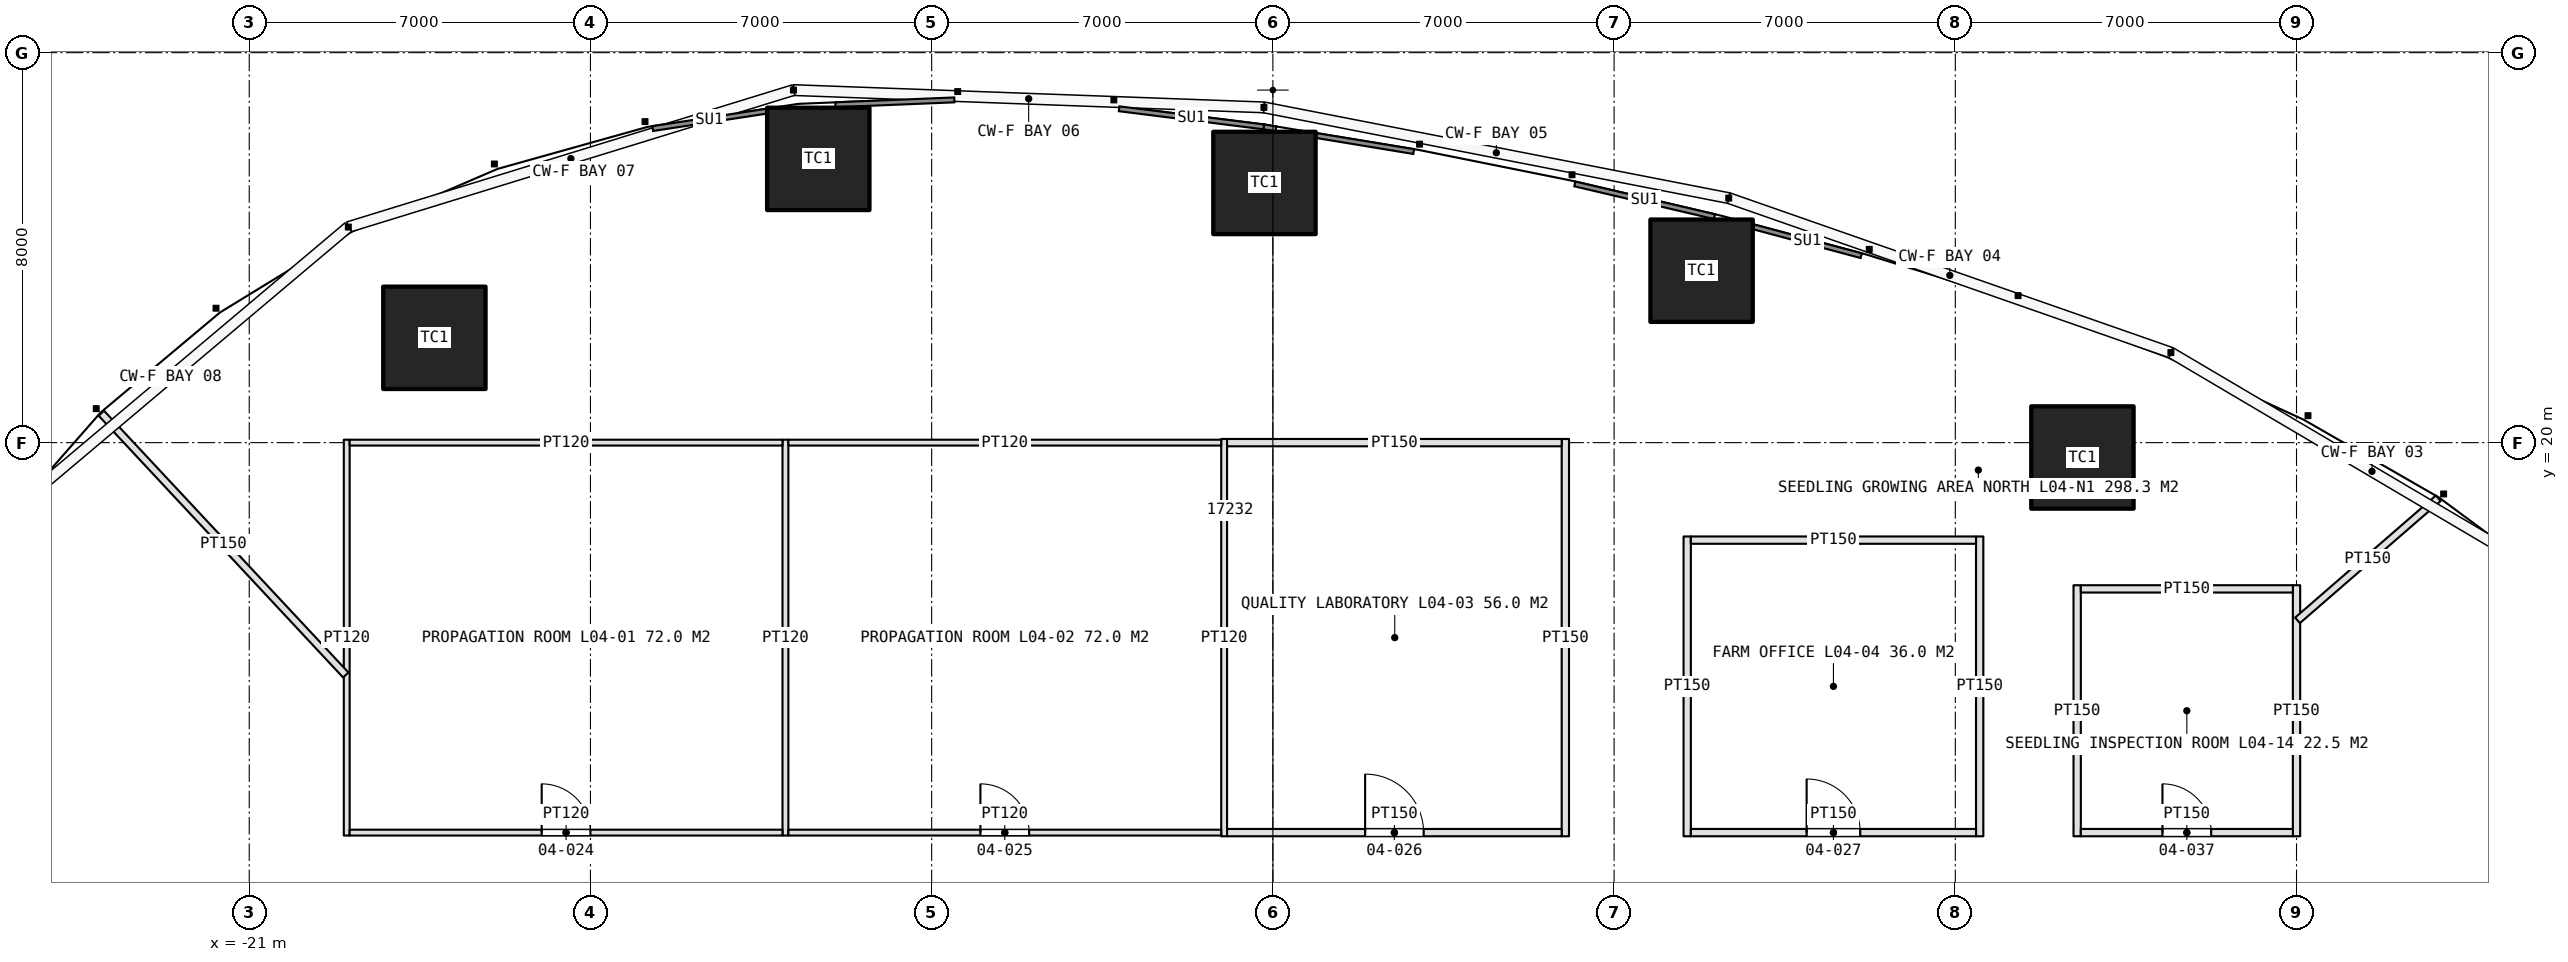
"""IFC4 building model, lengths in metres.
Left out: names, types, materials, properties, quantities, classifications, styles, units other than length and angle.
Written with IfcOpenShell. Run it as: python <this file> out.ifc"""

import sys

from ifc_helpers import new_model, si_unit, direction, frame, frame_2d, origin, origin_2d, place, context, subcontext, project, spatial, rectangle, extrude, element, fill, save


model = new_model("IFC4")
c1 = context("Model", 3, precision=1e-05, world=origin(), true_north=direction((0.0, 1.0)))
c2 = subcontext(c1, "Body", "Model", "MODEL_VIEW")
j1 = project(units=[si_unit("LENGTHUNIT", "METRE"), si_unit("PLANEANGLEUNIT", "RADIAN")], contexts=[c1])
p1 = place(None, origin())
s1 = spatial("IfcSite", under=j1, at=p1, CompositionType="ELEMENT")
p2 = place(p1, origin())
s2 = spatial("IfcBuilding", under=s1, at=p2, CompositionType="ELEMENT")
p3 = place(p2, frame((0.0, 0.0, 20.0)))
s3 = spatial("IfcBuildingStorey", under=s2, at=p3, CompositionType="ELEMENT", Elevation=20.0)
for number, where, z_axis, x_axis in (
    (1, (16.608, 19.695, 0.0), (0.0, 0.0, 1.0), (1.0, 0.0, 0.0)),
    (2, (8.795, 23.527, 0.0), (0.0, 0.0, 1.0), (1.0, 0.0, 0.0)),
    (3, (-0.173, 25.327, 0.0), (0.0, 0.0, 1.0), (1.0, 0.0, 0.0)),
    (4, (-9.326, 25.821, 0.0), (0.0, 0.0, 1.0), (1.0, 0.0, 0.0)),
    (5, (-17.202, 22.15, 0.0), (0.0, 0.0, 1.0), (1.0, 0.0, 0.0)),
):
    element("IfcColumn", number, at=place(p3, frame(where, z_axis=z_axis, x_axis=x_axis)), inside=s3, PredefinedType="COLUMN", context=c2, shape_type="SweptSolid", body=[
        extrude(rectangle(XDim=2.1, YDim=2.1, at=origin_2d()), origin(), (0.0, 0.0, 1.0), 5.0),
    ])
for number, where, z_axis, x_axis in (
    (6, (-19.0, 11.94, 0.0), (0.0, 0.0, 1.0), (0.0, 1.0, 0.0)),
    (7, (-10.0, 11.94, 0.0), (0.0, 0.0, 1.0), (0.0, 1.0, 0.0)),
):
    element("IfcWall", number, at=place(p3, frame(where, z_axis=z_axis, x_axis=x_axis)), inside=s3, PredefinedType="PARTITIONING", context=c2, shape_type="SweptSolid", body=[
        extrude(rectangle(XDim=8.12, YDim=0.12, at=frame_2d((4.06, 0.0))), origin(), (0.0, 0.0, 1.0), 3.6),
    ])
p4 = place(p3, frame((-1.0, 11.925, 0.0), z_axis=(0.0, 0.0, 1.0), x_axis=(0.0, 1.0, 0.0)))
e8 = element("IfcWall", 8, at=p4, inside=s3, PredefinedType="PARTITIONING", context=c2, shape_type="SweptSolid", body=[
    extrude(rectangle(XDim=8.15, YDim=0.12, at=frame_2d((4.075, 0.0))), origin(), (0.0, 0.0, 1.0), 3.6),
])
p5 = place(p3, frame((6.0, 11.925, 0.0), z_axis=(0.0, 0.0, 1.0), x_axis=(0.0, 1.0, 0.0)))
e9 = element("IfcWall", 9, at=p5, inside=s3, PredefinedType="PARTITIONING", context=c2, shape_type="SweptSolid", body=[
    extrude(rectangle(XDim=8.15, YDim=0.15, at=frame_2d((4.075, 0.0))), origin(), (0.0, 0.0, 1.0), 3.6),
])
p6 = place(p3, frame((-18.94, 12.0, 0.0), z_axis=(0.0, 0.0, 1.0), x_axis=(1.0, 0.0, 0.0)))
e10 = element("IfcWall", 10, at=p6, inside=s3, PredefinedType="PARTITIONING", context=c2, shape_type="SweptSolid", body=[
    extrude(rectangle(XDim=8.88, YDim=0.12, at=frame_2d((4.44, 0.0))), origin(), (0.0, 0.0, 1.0), 3.6),
])
p7 = place(p6, frame((3.94, 0.0, 0.0)))
e11 = element("IfcOpeningElement", 11, at=p7, cuts=e10, PredefinedType="OPENING", context=c2, shape_type="SweptSolid", body=[
    extrude(rectangle(XDim=1.0, YDim=2.2, at=frame_2d((0.5, 1.1))), frame((0.0, 0.07, 0.0), z_axis=(0.0, -1.0, 0.0), x_axis=(1.0, 0.0, 0.0)), (0.0, 0.0, 1.0), 0.14),
])
p8 = place(p3, frame((-18.94, 20.0, 0.0), z_axis=(0.0, 0.0, 1.0), x_axis=(1.0, 0.0, 0.0)))
e12 = element("IfcWall", 12, at=p8, inside=s3, PredefinedType="PARTITIONING", context=c2, shape_type="SweptSolid", body=[
    extrude(rectangle(XDim=8.88, YDim=0.12, at=frame_2d((4.44, 0.0))), origin(), (0.0, 0.0, 1.0), 3.6),
])
p9 = place(p3, frame((-9.94, 12.0, 0.0), z_axis=(0.0, 0.0, 1.0), x_axis=(1.0, 0.0, 0.0)))
e13 = element("IfcWall", 13, at=p9, inside=s3, PredefinedType="PARTITIONING", context=c2, shape_type="SweptSolid", body=[
    extrude(rectangle(XDim=8.88, YDim=0.12, at=frame_2d((4.44, 0.0))), origin(), (0.0, 0.0, 1.0), 3.6),
])
p10 = place(p9, frame((3.94, 0.0, 0.0)))
e14 = element("IfcOpeningElement", 14, at=p10, cuts=e13, PredefinedType="OPENING", context=c2, shape_type="SweptSolid", body=[
    extrude(rectangle(XDim=1.0, YDim=2.2, at=frame_2d((0.5, 1.1))), frame((0.0, 0.07, 0.0), z_axis=(0.0, -1.0, 0.0), x_axis=(1.0, 0.0, 0.0)), (0.0, 0.0, 1.0), 0.14),
])
p11 = place(p3, frame((-9.94, 20.0, 0.0), z_axis=(0.0, 0.0, 1.0), x_axis=(1.0, 0.0, 0.0)))
e15 = element("IfcWall", 15, at=p11, inside=s3, PredefinedType="PARTITIONING", context=c2, shape_type="SweptSolid", body=[
    extrude(rectangle(XDim=8.88, YDim=0.12, at=frame_2d((4.44, 0.0))), origin(), (0.0, 0.0, 1.0), 3.6),
])
p12 = place(p3, frame((-0.94, 12.0, 0.0), z_axis=(0.0, 0.0, 1.0), x_axis=(1.0, 0.0, 0.0)))
e16 = element("IfcWall", 16, at=p12, inside=s3, PredefinedType="PARTITIONING", context=c2, shape_type="SweptSolid", body=[
    extrude(rectangle(XDim=6.865, YDim=0.15, at=frame_2d((3.433, 0.0))), origin(), (0.0, 0.0, 1.0), 3.6),
])
p13 = place(p12, frame((2.833, 0.0, 0.0)))
e17 = element("IfcOpeningElement", 17, at=p13, cuts=e16, PredefinedType="OPENING", context=c2, shape_type="SweptSolid", body=[
    extrude(rectangle(XDim=1.2, YDim=2.3, at=frame_2d((0.6, 1.15))), frame((0.0, 0.085, 0.0), z_axis=(0.0, -1.0, 0.0), x_axis=(1.0, 0.0, 0.0)), (0.0, 0.0, 1.0), 0.17),
])
p14 = place(p3, frame((-0.94, 20.0, 0.0), z_axis=(0.0, 0.0, 1.0), x_axis=(1.0, 0.0, 0.0)))
e18 = element("IfcWall", 18, at=p14, inside=s3, PredefinedType="PARTITIONING", context=c2, shape_type="SweptSolid", body=[
    extrude(rectangle(XDim=6.865, YDim=0.15, at=frame_2d((3.433, 0.0))), origin(), (0.0, 0.0, 1.0), 3.6),
])
for number, where, z_axis, x_axis in (
    (19, (8.5, 11.925, 0.0), (0.0, 0.0, 1.0), (0.0, 1.0, 0.0)),
    (20, (14.5, 11.925, 0.0), (0.0, 0.0, 1.0), (0.0, 1.0, 0.0)),
):
    element("IfcWall", number, at=place(p3, frame(where, z_axis=z_axis, x_axis=x_axis)), inside=s3, PredefinedType="PARTITIONING", context=c2, shape_type="SweptSolid", body=[
        extrude(rectangle(XDim=6.15, YDim=0.15, at=frame_2d((3.075, 0.0))), origin(), (0.0, 0.0, 1.0), 3.6),
    ])
p15 = place(p3, frame((8.575, 12.0, 0.0), z_axis=(0.0, 0.0, 1.0), x_axis=(1.0, 0.0, 0.0)))
e21 = element("IfcWall", 21, at=p15, inside=s3, PredefinedType="PARTITIONING", context=c2, shape_type="SweptSolid", body=[
    extrude(rectangle(XDim=5.85, YDim=0.15, at=frame_2d((2.925, 0.0))), origin(), (0.0, 0.0, 1.0), 3.6),
])
p16 = place(p15, frame((2.375, 0.0, 0.0)))
e22 = element("IfcOpeningElement", 22, at=p16, cuts=e21, PredefinedType="OPENING", context=c2, shape_type="SweptSolid", body=[
    extrude(rectangle(XDim=1.1, YDim=2.3, at=frame_2d((0.55, 1.15))), frame((0.0, 0.085, 0.0), z_axis=(0.0, -1.0, 0.0), x_axis=(1.0, 0.0, 0.0)), (0.0, 0.0, 1.0), 0.17),
])
p17 = place(p3, frame((8.575, 18.0, 0.0), z_axis=(0.0, 0.0, 1.0), x_axis=(1.0, 0.0, 0.0)))
e23 = element("IfcWall", 23, at=p17, inside=s3, PredefinedType="PARTITIONING", context=c2, shape_type="SweptSolid", body=[
    extrude(rectangle(XDim=5.85, YDim=0.15, at=frame_2d((2.925, 0.0))), origin(), (0.0, 0.0, 1.0), 3.6),
])
for number, where, z_axis, x_axis in (
    (24, (16.5, 11.925, 0.0), (0.0, 0.0, 1.0), (0.0, 1.0, 0.0)),
    (25, (21.0, 11.925, 0.0), (0.0, 0.0, 1.0), (0.0, 1.0, 0.0)),
):
    element("IfcWall", number, at=place(p3, frame(where, z_axis=z_axis, x_axis=x_axis)), inside=s3, PredefinedType="PARTITIONING", context=c2, shape_type="SweptSolid", body=[
        extrude(rectangle(XDim=5.15, YDim=0.15, at=frame_2d((2.575, 0.0))), origin(), (0.0, 0.0, 1.0), 3.6),
    ])
p18 = place(p3, frame((16.575, 12.0, 0.0), z_axis=(0.0, 0.0, 1.0), x_axis=(1.0, 0.0, 0.0)))
e26 = element("IfcWall", 26, at=p18, inside=s3, PredefinedType="PARTITIONING", context=c2, shape_type="SweptSolid", body=[
    extrude(rectangle(XDim=4.35, YDim=0.15, at=frame_2d((2.175, 0.0))), origin(), (0.0, 0.0, 1.0), 3.6),
])
p19 = place(p18, frame((1.675, 0.0, 0.0)))
e27 = element("IfcOpeningElement", 27, at=p19, cuts=e26, PredefinedType="OPENING", context=c2, shape_type="SweptSolid", body=[
    extrude(rectangle(XDim=1.0, YDim=2.2, at=frame_2d((0.5, 1.1))), frame((0.0, 0.085, 0.0), z_axis=(0.0, -1.0, 0.0), x_axis=(1.0, 0.0, 0.0)), (0.0, 0.0, 1.0), 0.17),
])
p20 = place(p3, frame((16.575, 17.0, 0.0), z_axis=(0.0, 0.0, 1.0), x_axis=(1.0, 0.0, 0.0)))
e28 = element("IfcWall", 28, at=p20, inside=s3, PredefinedType="PARTITIONING", context=c2, shape_type="SweptSolid", body=[
    extrude(rectangle(XDim=4.35, YDim=0.15, at=frame_2d((2.175, 0.0))), origin(), (0.0, 0.0, 1.0), 3.6),
])
p21 = place(p3, frame((-19.02, 15.234, 0.0), z_axis=(0.0, 0.0, 1.0), x_axis=(-0.682519491562, 0.730867391281, 0.0)))
e29 = element("IfcWall", 29, at=p21, inside=s3, PredefinedType="PARTITIONING", context=c2, shape_type="SweptSolid", body=[
    extrude(rectangle(XDim=7.347, YDim=0.15, at=frame_2d((3.674, 0.0))), origin(), (0.0, 0.0, 1.0), 3.6),
])
p22 = place(p3, frame((21.02, 16.354, 0.0), z_axis=(0.0, 0.0, 1.0), x_axis=(0.755425653008, 0.655234372402, 0.0)))
e30 = element("IfcWall", 30, at=p22, inside=s3, PredefinedType="PARTITIONING", context=c2, shape_type="SweptSolid", body=[
    extrude(rectangle(XDim=3.823, YDim=0.15, at=frame_2d((1.912, 0.0))), origin(), (0.0, 0.0, 1.0), 3.6),
])
p23 = place(p7, origin())
e31 = element("IfcDoor", 31, at=p23, inside=s3, OperationType="SINGLE_SWING_LEFT", PredefinedType="DOOR", context=c2, shape_type="SweptSolid", body=[
    extrude(rectangle(XDim=1.0, YDim=2.2, at=frame_2d((0.5, 1.1))), frame((0.0, 0.025, 0.0), z_axis=(0.0, -1.0, 0.0), x_axis=(1.0, 0.0, 0.0)), (0.0, 0.0, 1.0), 0.05),
])
fill(e11, e31)
p24 = place(p10, origin())
e32 = element("IfcDoor", 32, at=p24, inside=s3, OperationType="SINGLE_SWING_LEFT", PredefinedType="DOOR", context=c2, shape_type="SweptSolid", body=[
    extrude(rectangle(XDim=1.0, YDim=2.2, at=frame_2d((0.5, 1.1))), frame((0.0, 0.025, 0.0), z_axis=(0.0, -1.0, 0.0), x_axis=(1.0, 0.0, 0.0)), (0.0, 0.0, 1.0), 0.05),
])
fill(e14, e32)
p25 = place(p13, origin())
e33 = element("IfcDoor", 33, at=p25, inside=s3, OperationType="SINGLE_SWING_LEFT", PredefinedType="DOOR", context=c2, shape_type="SweptSolid", body=[
    extrude(rectangle(XDim=1.2, YDim=2.3, at=frame_2d((0.6, 1.15))), frame((0.0, 0.025, 0.0), z_axis=(0.0, -1.0, 0.0), x_axis=(1.0, 0.0, 0.0)), (0.0, 0.0, 1.0), 0.05),
])
fill(e17, e33)
p26 = place(p16, origin())
e34 = element("IfcDoor", 34, at=p26, inside=s3, OperationType="SINGLE_SWING_LEFT", PredefinedType="DOOR", context=c2, shape_type="SweptSolid", body=[
    extrude(rectangle(XDim=1.1, YDim=2.3, at=frame_2d((0.55, 1.15))), frame((0.0, 0.025, 0.0), z_axis=(0.0, -1.0, 0.0), x_axis=(1.0, 0.0, 0.0)), (0.0, 0.0, 1.0), 0.05),
])
fill(e22, e34)
p27 = place(p19, origin())
e35 = element("IfcDoor", 35, at=p27, inside=s3, OperationType="SINGLE_SWING_LEFT", PredefinedType="DOOR", context=c2, shape_type="SweptSolid", body=[
    extrude(rectangle(XDim=1.0, YDim=2.2, at=frame_2d((0.5, 1.1))), frame((0.0, 0.025, 0.0), z_axis=(0.0, -1.0, 0.0), x_axis=(1.0, 0.0, 0.0)), (0.0, 0.0, 1.0), 0.05),
])
fill(e27, e35)
save(model, sys.argv[1])
